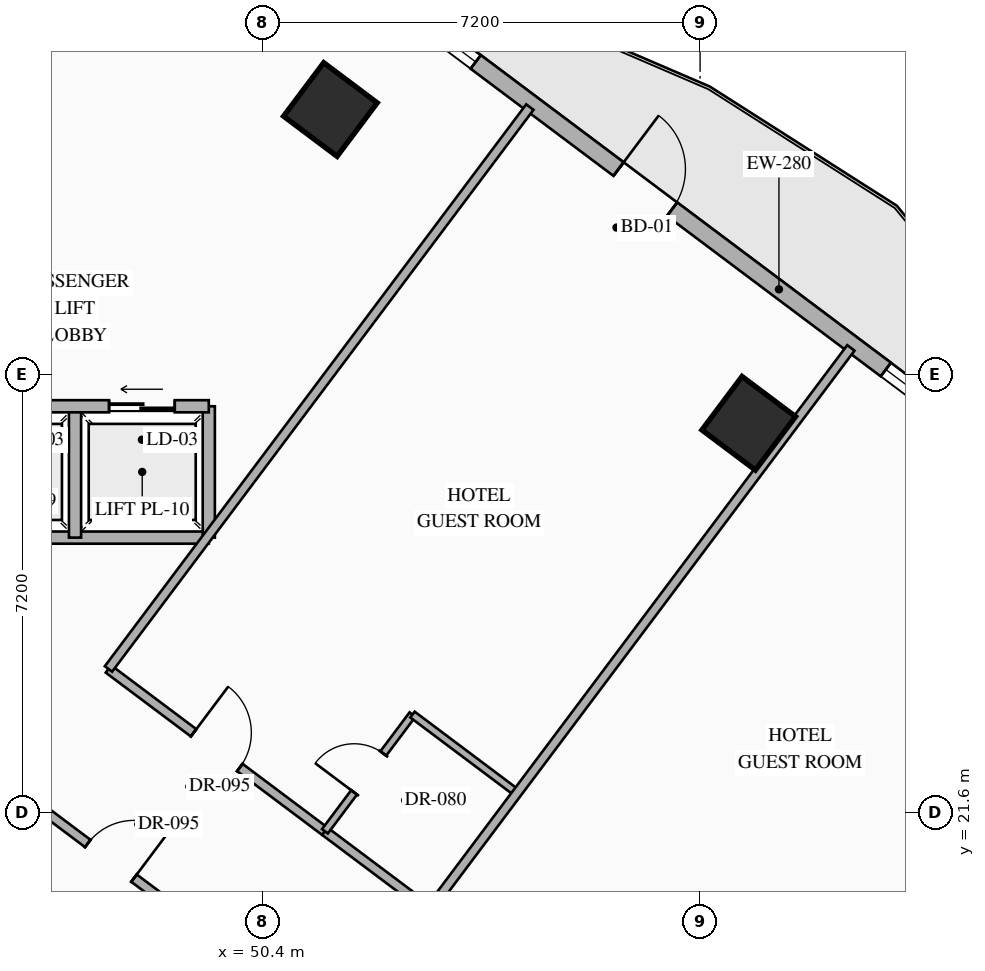
"""IFC4 building model, lengths in metres.
Left out: names, types, materials, properties, quantities, classifications, styles, units other than length and angle.
Written with IfcOpenShell. Run it as: python <this file> out.ifc"""

import sys

from ifc_helpers import new_model, si_unit, direction, frame, frame_2d, origin, origin_2d, place, context, subcontext, project, spatial, rectangle, hollow_rectangle, extrude, element, fill, save


model = new_model("IFC4")
c1 = context("Model", 3, precision=1e-05, world=origin(), true_north=direction((0.0, 1.0)))
c2 = subcontext(c1, "Body", "Model", "MODEL_VIEW")
j1 = project(units=[si_unit("LENGTHUNIT", "METRE"), si_unit("PLANEANGLEUNIT", "RADIAN")], contexts=[c1])
p1 = place(None, origin())
s1 = spatial("IfcSite", under=j1, at=p1, CompositionType="ELEMENT")
p2 = place(p1, origin())
s2 = spatial("IfcBuilding", under=s1, at=p2, CompositionType="ELEMENT")
p3 = place(p2, frame((0.0, 0.0, 53.35)))
s3 = spatial("IfcBuildingStorey", under=s2, at=p3, CompositionType="ELEMENT", Elevation=53.35)
for number, where, z_axis, x_axis in (
    (1, (51.52, 33.16, 0.0), (0.0, 0.0, 1.0), (0.8, -0.6, 0.0)),
    (2, (58.4, 28.0, 0.0), (0.0, 0.0, 1.0), (0.8, -0.6, 0.0)),
):
    element("IfcColumn", number, at=place(p3, frame(where, z_axis=z_axis, x_axis=x_axis)), inside=s3, PredefinedType="COLUMN", context=c2, shape_type="SweptSolid", body=[
        extrude(hollow_rectangle(XDim=1.1, YDim=1.1, WallThickness=0.04, at=origin_2d()), origin(), (0.0, 0.0, 1.0), 3.35),
    ])
p4 = place(p3, frame((44.86, 40.73, 0.0), z_axis=(0.0, 0.0, 1.0), x_axis=(0.800006902154, -0.599990797017, 0.0)))
e3 = element("IfcWall", 3, at=p4, inside=s3, PredefinedType="STANDARD", context=c2, shape_type="SweptSolid", body=[
    extrude(rectangle(XDim=29.712, YDim=0.28, at=frame_2d((14.856, 0.0))), origin(), (0.0, 0.0, 1.0), 3.13),
])
p5 = place(p4, frame((14.249, 0.0, 0.0)))
e4 = element("IfcOpeningElement", 4, at=p5, cuts=e3, PredefinedType="OPENING", context=c2, shape_type="SweptSolid", body=[
    extrude(rectangle(XDim=1.1, YDim=2.2, at=frame_2d((0.55, 1.1))), frame((0.0, 0.15, 0.0), z_axis=(0.0, -1.0, 0.0), x_axis=(1.0, 0.0, 0.0)), (0.0, 0.0, 1.0), 0.3),
])
p6 = place(p4, frame((1.612, 0.0, 0.85)))
e5 = element("IfcOpeningElement", 5, at=p6, cuts=e3, PredefinedType="OPENING", context=c2, shape_type="SweptSolid", body=[
    extrude(rectangle(XDim=1.4, YDim=1.8, at=frame_2d((0.7, 0.9))), frame((0.0, 0.15, 0.0), z_axis=(0.0, -1.0, 0.0), x_axis=(1.0, 0.0, 0.0)), (0.0, 0.0, 1.0), 0.3),
])
p7 = place(p4, frame((5.667, 0.0, 0.85)))
e6 = element("IfcOpeningElement", 6, at=p7, cuts=e3, PredefinedType="OPENING", context=c2, shape_type="SweptSolid", body=[
    extrude(rectangle(XDim=1.4, YDim=1.8, at=frame_2d((0.7, 0.9))), frame((0.0, 0.15, 0.0), z_axis=(0.0, -1.0, 0.0), x_axis=(1.0, 0.0, 0.0)), (0.0, 0.0, 1.0), 0.3),
])
p8 = place(p4, frame((9.912, 0.0, 0.85)))
e7 = element("IfcOpeningElement", 7, at=p8, cuts=e3, PredefinedType="OPENING", context=c2, shape_type="SweptSolid", body=[
    extrude(rectangle(XDim=1.4, YDim=1.8, at=frame_2d((0.7, 0.9))), frame((0.0, 0.15, 0.0), z_axis=(0.0, -1.0, 0.0), x_axis=(1.0, 0.0, 0.0)), (0.0, 0.0, 1.0), 0.3),
])
p9 = place(p4, frame((19.743, 0.0, 0.85)))
e8 = element("IfcOpeningElement", 8, at=p9, cuts=e3, PredefinedType="OPENING", context=c2, shape_type="SweptSolid", body=[
    extrude(rectangle(XDim=1.4, YDim=1.8, at=frame_2d((0.7, 0.9))), frame((0.0, 0.15, 0.0), z_axis=(0.0, -1.0, 0.0), x_axis=(1.0, 0.0, 0.0)), (0.0, 0.0, 1.0), 0.3),
])
p10 = place(p4, frame((22.645, 0.0, 0.85)))
e9 = element("IfcOpeningElement", 9, at=p10, cuts=e3, PredefinedType="OPENING", context=c2, shape_type="SweptSolid", body=[
    extrude(rectangle(XDim=1.4, YDim=1.8, at=frame_2d((0.7, 0.9))), frame((0.0, 0.15, 0.0), z_axis=(0.0, -1.0, 0.0), x_axis=(1.0, 0.0, 0.0)), (0.0, 0.0, 1.0), 0.3),
])
p11 = place(p4, frame((26.7, 0.0, 0.85)))
e10 = element("IfcOpeningElement", 10, at=p11, cuts=e3, PredefinedType="OPENING", context=c2, shape_type="SweptSolid", body=[
    extrude(rectangle(XDim=1.4, YDim=1.8, at=frame_2d((0.7, 0.9))), frame((0.0, 0.15, 0.0), z_axis=(0.0, -1.0, 0.0), x_axis=(1.0, 0.0, 0.0)), (0.0, 0.0, 1.0), 0.3),
])
p12 = place(p3, frame((53.318, 2.487, 0.0), z_axis=(0.0, 0.0, 1.0), x_axis=(-0.800004174678, 0.599994433723, 0.0)))
e11 = element("IfcWall", 11, at=p12, inside=s3, PredefinedType="STANDARD", context=c2, shape_type="SweptSolid", body=[
    extrude(rectangle(XDim=35.089, YDim=0.28, at=frame_2d((17.544, 0.0))), origin(), (0.0, 0.0, 1.0), 3.13),
])
p13 = place(p12, frame((1.931, 0.0, 0.85)))
e12 = element("IfcOpeningElement", 12, at=p13, cuts=e11, PredefinedType="OPENING", context=c2, shape_type="SweptSolid", body=[
    extrude(rectangle(XDim=1.4, YDim=1.8, at=frame_2d((0.7, 0.9))), frame((0.0, 0.15, 0.0), z_axis=(0.0, -1.0, 0.0), x_axis=(1.0, 0.0, 0.0)), (0.0, 0.0, 1.0), 0.3),
])
p14 = place(p12, frame((6.819, 0.0, 0.85)))
e13 = element("IfcOpeningElement", 13, at=p14, cuts=e11, PredefinedType="OPENING", context=c2, shape_type="SweptSolid", body=[
    extrude(rectangle(XDim=1.4, YDim=1.8, at=frame_2d((0.7, 0.9))), frame((0.0, 0.15, 0.0), z_axis=(0.0, -1.0, 0.0), x_axis=(1.0, 0.0, 0.0)), (0.0, 0.0, 1.0), 0.3),
])
p15 = place(p12, frame((11.832, 0.0, 0.85)))
e14 = element("IfcOpeningElement", 14, at=p15, cuts=e11, PredefinedType="OPENING", context=c2, shape_type="SweptSolid", body=[
    extrude(rectangle(XDim=1.4, YDim=1.8, at=frame_2d((0.7, 0.9))), frame((0.0, 0.15, 0.0), z_axis=(0.0, -1.0, 0.0), x_axis=(1.0, 0.0, 0.0)), (0.0, 0.0, 1.0), 0.3),
])
p16 = place(p12, frame((17.647, 0.0, 0.85)))
e15 = element("IfcOpeningElement", 15, at=p16, cuts=e11, PredefinedType="OPENING", context=c2, shape_type="SweptSolid", body=[
    extrude(rectangle(XDim=1.4, YDim=1.8, at=frame_2d((0.7, 0.9))), frame((0.0, 0.15, 0.0), z_axis=(0.0, -1.0, 0.0), x_axis=(1.0, 0.0, 0.0)), (0.0, 0.0, 1.0), 0.3),
])
p17 = place(p12, frame((21.857, 0.0, 0.85)))
e16 = element("IfcOpeningElement", 16, at=p17, cuts=e11, PredefinedType="OPENING", context=c2, shape_type="SweptSolid", body=[
    extrude(rectangle(XDim=1.4, YDim=1.8, at=frame_2d((0.7, 0.9))), frame((0.0, 0.15, 0.0), z_axis=(0.0, -1.0, 0.0), x_axis=(1.0, 0.0, 0.0)), (0.0, 0.0, 1.0), 0.3),
])
p18 = place(p12, frame((26.87, 0.0, 0.85)))
e17 = element("IfcOpeningElement", 17, at=p18, cuts=e11, PredefinedType="OPENING", context=c2, shape_type="SweptSolid", body=[
    extrude(rectangle(XDim=1.4, YDim=1.8, at=frame_2d((0.7, 0.9))), frame((0.0, 0.15, 0.0), z_axis=(0.0, -1.0, 0.0), x_axis=(1.0, 0.0, 0.0)), (0.0, 0.0, 1.0), 0.3),
])
p19 = place(p12, frame((31.757, 0.0, 0.85)))
e18 = element("IfcOpeningElement", 18, at=p19, cuts=e11, PredefinedType="OPENING", context=c2, shape_type="SweptSolid", body=[
    extrude(rectangle(XDim=1.4, YDim=1.8, at=frame_2d((0.7, 0.9))), frame((0.0, 0.15, 0.0), z_axis=(0.0, -1.0, 0.0), x_axis=(1.0, 0.0, 0.0)), (0.0, 0.0, 1.0), 0.3),
])
p20 = place(p3, frame((45.12, 26.12, 0.0), z_axis=(0.0, 0.0, 1.0), x_axis=(1.0, 0.0, 0.0)))
e19 = element("IfcWall", 19, at=p20, inside=s3, PredefinedType="STANDARD", context=c2, shape_type="SweptSolid", body=[
    extrude(rectangle(XDim=4.4, YDim=0.2, at=frame_2d((2.2, 0.0))), origin(), (0.0, 0.0, 1.0), 3.13),
])
for number, where, z_axis, x_axis in (
    (20, (49.52, 26.12, 0.0), (0.0, 0.0, 1.0), (0.0, 1.0, 0.0)),
    (21, (47.32, 26.12, 0.0), (0.0, 0.0, 1.0), (0.0, 1.0, 0.0)),
):
    element("IfcWall", number, at=place(p3, frame(where, z_axis=z_axis, x_axis=x_axis)), inside=s3, PredefinedType="STANDARD", context=c2, shape_type="SweptSolid", body=[
        extrude(rectangle(XDim=2.16, YDim=0.2, at=frame_2d((1.08, 0.0))), origin(), (0.0, 0.0, 1.0), 3.13),
    ])
p21 = place(p3, frame((45.12, 28.28, 0.0), z_axis=(0.0, 0.0, 1.0), x_axis=(1.0, 0.0, 0.0)))
e22 = element("IfcWall", 22, at=p21, inside=s3, PredefinedType="STANDARD", context=c2, shape_type="SweptSolid", body=[
    extrude(rectangle(XDim=4.4, YDim=0.2, at=frame_2d((2.2, 0.0))), origin(), (0.0, 0.0, 1.0), 3.13),
])
p22 = place(p21, frame((0.56, 0.0, 0.0)))
e23 = element("IfcOpeningElement", 23, at=p22, cuts=e22, PredefinedType="OPENING", context=c2, shape_type="SweptSolid", body=[
    extrude(rectangle(XDim=1.08, YDim=2.15, at=frame_2d((0.54, 1.075))), frame((0.0, 0.11, 0.0), z_axis=(0.0, -1.0, 0.0), x_axis=(1.0, 0.0, 0.0)), (0.0, 0.0, 1.0), 0.22),
])
p23 = place(p21, frame((2.76, 0.0, 0.0)))
e24 = element("IfcOpeningElement", 24, at=p23, cuts=e22, PredefinedType="OPENING", context=c2, shape_type="SweptSolid", body=[
    extrude(rectangle(XDim=1.08, YDim=2.15, at=frame_2d((0.54, 1.075))), frame((0.0, 0.11, 0.0), z_axis=(0.0, -1.0, 0.0), x_axis=(1.0, 0.0, 0.0)), (0.0, 0.0, 1.0), 0.22),
])
p24 = place(p3, frame((47.87, 23.96, 0.0), z_axis=(0.0, 0.0, 1.0), x_axis=(0.799993416095, -0.600008778439, 0.0)))
e25 = element("IfcWall", 25, at=p24, inside=s3, PredefinedType="PARTITIONING", context=c2, shape_type="SweptSolid", body=[
    extrude(rectangle(XDim=4.45, YDim=0.15, at=frame_2d((2.225, 0.0))), origin(), (0.0, 0.0, 1.0), 2.775),
])
p25 = place(p24, frame((1.75, 0.0, 0.0)))
e26 = element("IfcOpeningElement", 26, at=p25, cuts=e25, PredefinedType="OPENING", context=c2, shape_type="SweptSolid", body=[
    extrude(rectangle(XDim=0.95, YDim=2.15, at=frame_2d((0.475, 1.075))), frame((0.0, 0.085, 0.0), z_axis=(0.0, -1.0, 0.0), x_axis=(1.0, 0.0, 0.0)), (0.0, 0.0, 1.0), 0.17),
])
p26 = place(p3, frame((51.43, 21.29, 0.0), z_axis=(0.0, 0.0, 1.0), x_axis=(0.79998637334, -0.60001816845, 0.0)))
e27 = element("IfcWall", 27, at=p26, inside=s3, PredefinedType="PARTITIONING", context=c2, shape_type="SweptSolid", body=[
    extrude(rectangle(XDim=2.15, YDim=0.15, at=frame_2d((1.075, 0.0))), origin(), (0.0, 0.0, 1.0), 2.775),
])
p27 = place(p3, frame((51.43, 21.29, 0.0), z_axis=(0.0, 0.0, 1.0), x_axis=(0.600065100855, 0.79995117022, 0.0)))
e28 = element("IfcWall", 28, at=p27, inside=s3, PredefinedType="PARTITIONING", context=c2, shape_type="SweptSolid", body=[
    extrude(rectangle(XDim=2.4, YDim=0.12, at=frame_2d((1.2, 0.0))), origin(), (0.0, 0.0, 1.0), 3.13),
])
p28 = place(p27, frame((0.8, 0.0, 0.0)))
e29 = element("IfcOpeningElement", 29, at=p28, cuts=e28, PredefinedType="OPENING", context=c2, shape_type="SweptSolid", body=[
    extrude(rectangle(XDim=0.8, YDim=2.06, at=frame_2d((0.4, 1.03))), frame((0.0, 0.07, 0.0), z_axis=(0.0, -1.0, 0.0), x_axis=(1.0, 0.0, 0.0)), (0.0, 0.0, 1.0), 0.14),
])
p29 = place(p3, frame((52.87, 23.21, 0.0), z_axis=(0.0, 0.0, 1.0), x_axis=(0.79998637334, -0.60001816845, 0.0)))
e30 = element("IfcWall", 30, at=p29, inside=s3, PredefinedType="PARTITIONING", context=c2, shape_type="SweptSolid", body=[
    extrude(rectangle(XDim=2.15, YDim=0.12, at=frame_2d((1.075, 0.0))), origin(), (0.0, 0.0, 1.0), 3.13),
])
for number, where, z_axis, x_axis in (
    (31, (47.87, 23.96, 0.0), (0.0, 0.0, 1.0), (0.6, 0.8, 0.0)),
    (32, (53.15, 20.0, 0.0), (0.0, 0.0, 1.0), (0.6, 0.8, 0.0)),
    (33, (58.43, 16.04, 0.0), (0.0, 0.0, 1.0), (0.6, 0.8, 0.0)),
):
    element("IfcWall", number, at=place(p3, frame(where, z_axis=z_axis, x_axis=x_axis)), inside=s3, PredefinedType="PARTITIONING", context=c2, shape_type="SweptSolid", body=[
        extrude(rectangle(XDim=11.55, YDim=0.15, at=frame_2d((5.775, 0.0))), origin(), (0.0, 0.0, 1.0), 3.13),
    ])
p30 = place(p3, frame((46.37, 21.96, 0.0), z_axis=(0.0, 0.0, 1.0), x_axis=(0.799977170108, -0.600030438649, 0.0)))
e34 = element("IfcWall", 34, at=p30, inside=s3, PredefinedType="PARTITIONING", context=c2, shape_type="SweptSolid", body=[
    extrude(rectangle(XDim=3.85, YDim=0.15, at=frame_2d((1.925, 0.0))), origin(), (0.0, 0.0, 1.0), 2.425),
])
p31 = place(p30, frame((1.45, 0.0, 0.0)))
e35 = element("IfcOpeningElement", 35, at=p31, cuts=e34, PredefinedType="OPENING", context=c2, shape_type="SweptSolid", body=[
    extrude(rectangle(XDim=0.95, YDim=2.15, at=frame_2d((0.475, 1.075))), frame((0.0, 0.085, 0.0), z_axis=(0.0, -1.0, 0.0), x_axis=(1.0, 0.0, 0.0)), (0.0, 0.0, 1.0), 0.17),
])
p32 = place(p5, origin())
e36 = element("IfcDoor", 36, at=p32, inside=s3, OperationType="SINGLE_SWING_LEFT", PredefinedType="DOOR", context=c2, shape_type="SweptSolid", body=[
    extrude(rectangle(XDim=1.1, YDim=2.2, at=frame_2d((0.55, 1.1))), frame((0.0, 0.025, 0.0), z_axis=(0.0, -1.0, 0.0), x_axis=(1.0, 0.0, 0.0)), (0.0, 0.0, 1.0), 0.05),
])
fill(e4, e36)
p33 = place(p8, origin())
e37 = element("IfcWindow", 37, at=p33, inside=s3, PartitioningType="SINGLE_PANEL", PredefinedType="WINDOW", context=c2, shape_type="SweptSolid", body=[
    extrude(rectangle(XDim=1.4, YDim=1.8, at=frame_2d((0.7, 0.9))), frame((0.0, 0.03, 0.0), z_axis=(0.0, -1.0, 0.0), x_axis=(1.0, 0.0, 0.0)), (0.0, 0.0, 1.0), 0.06),
])
fill(e7, e37)
p34 = place(p9, origin())
e38 = element("IfcWindow", 38, at=p34, inside=s3, PartitioningType="SINGLE_PANEL", PredefinedType="WINDOW", context=c2, shape_type="SweptSolid", body=[
    extrude(rectangle(XDim=1.4, YDim=1.8, at=frame_2d((0.7, 0.9))), frame((0.0, 0.03, 0.0), z_axis=(0.0, -1.0, 0.0), x_axis=(1.0, 0.0, 0.0)), (0.0, 0.0, 1.0), 0.06),
])
fill(e8, e38)
p35 = place(p23, origin())
e39 = element("IfcDoor", 39, at=p35, inside=s3, OperationType="SLIDING_TO_LEFT", PredefinedType="USERDEFINED", context=c2, shape_type="SweptSolid", body=[
    extrude(rectangle(XDim=1.08, YDim=2.15, at=frame_2d((0.54, 1.075))), frame((0.0, 0.025, 0.0), z_axis=(0.0, -1.0, 0.0), x_axis=(1.0, 0.0, 0.0)), (0.0, 0.0, 1.0), 0.05),
])
fill(e24, e39)
p36 = place(p25, origin())
e40 = element("IfcDoor", 40, at=p36, inside=s3, OperationType="SINGLE_SWING_LEFT", PredefinedType="DOOR", context=c2, shape_type="SweptSolid", body=[
    extrude(rectangle(XDim=0.95, YDim=2.15, at=frame_2d((0.475, 1.075))), frame((0.0, 0.025, 0.0), z_axis=(0.0, -1.0, 0.0), x_axis=(1.0, 0.0, 0.0)), (0.0, 0.0, 1.0), 0.05),
])
fill(e26, e40)
p37 = place(p28, origin())
e41 = element("IfcDoor", 41, at=p37, inside=s3, OperationType="SINGLE_SWING_LEFT", PredefinedType="DOOR", context=c2, shape_type="SweptSolid", body=[
    extrude(rectangle(XDim=0.8, YDim=2.06, at=frame_2d((0.4, 1.03))), frame((0.0, 0.025, 0.0), z_axis=(0.0, -1.0, 0.0), x_axis=(1.0, 0.0, 0.0)), (0.0, 0.0, 1.0), 0.05),
])
fill(e29, e41)
p38 = place(p31, origin())
e42 = element("IfcDoor", 42, at=p38, inside=s3, OperationType="SINGLE_SWING_RIGHT", PredefinedType="DOOR", context=c2, shape_type="SweptSolid", body=[
    extrude(rectangle(XDim=0.95, YDim=2.15, at=frame_2d((0.475, 1.075))), frame((0.0, 0.025, 0.0), z_axis=(0.0, -1.0, 0.0), x_axis=(1.0, 0.0, 0.0)), (0.0, 0.0, 1.0), 0.05),
])
fill(e35, e42)
save(model, sys.argv[1])
